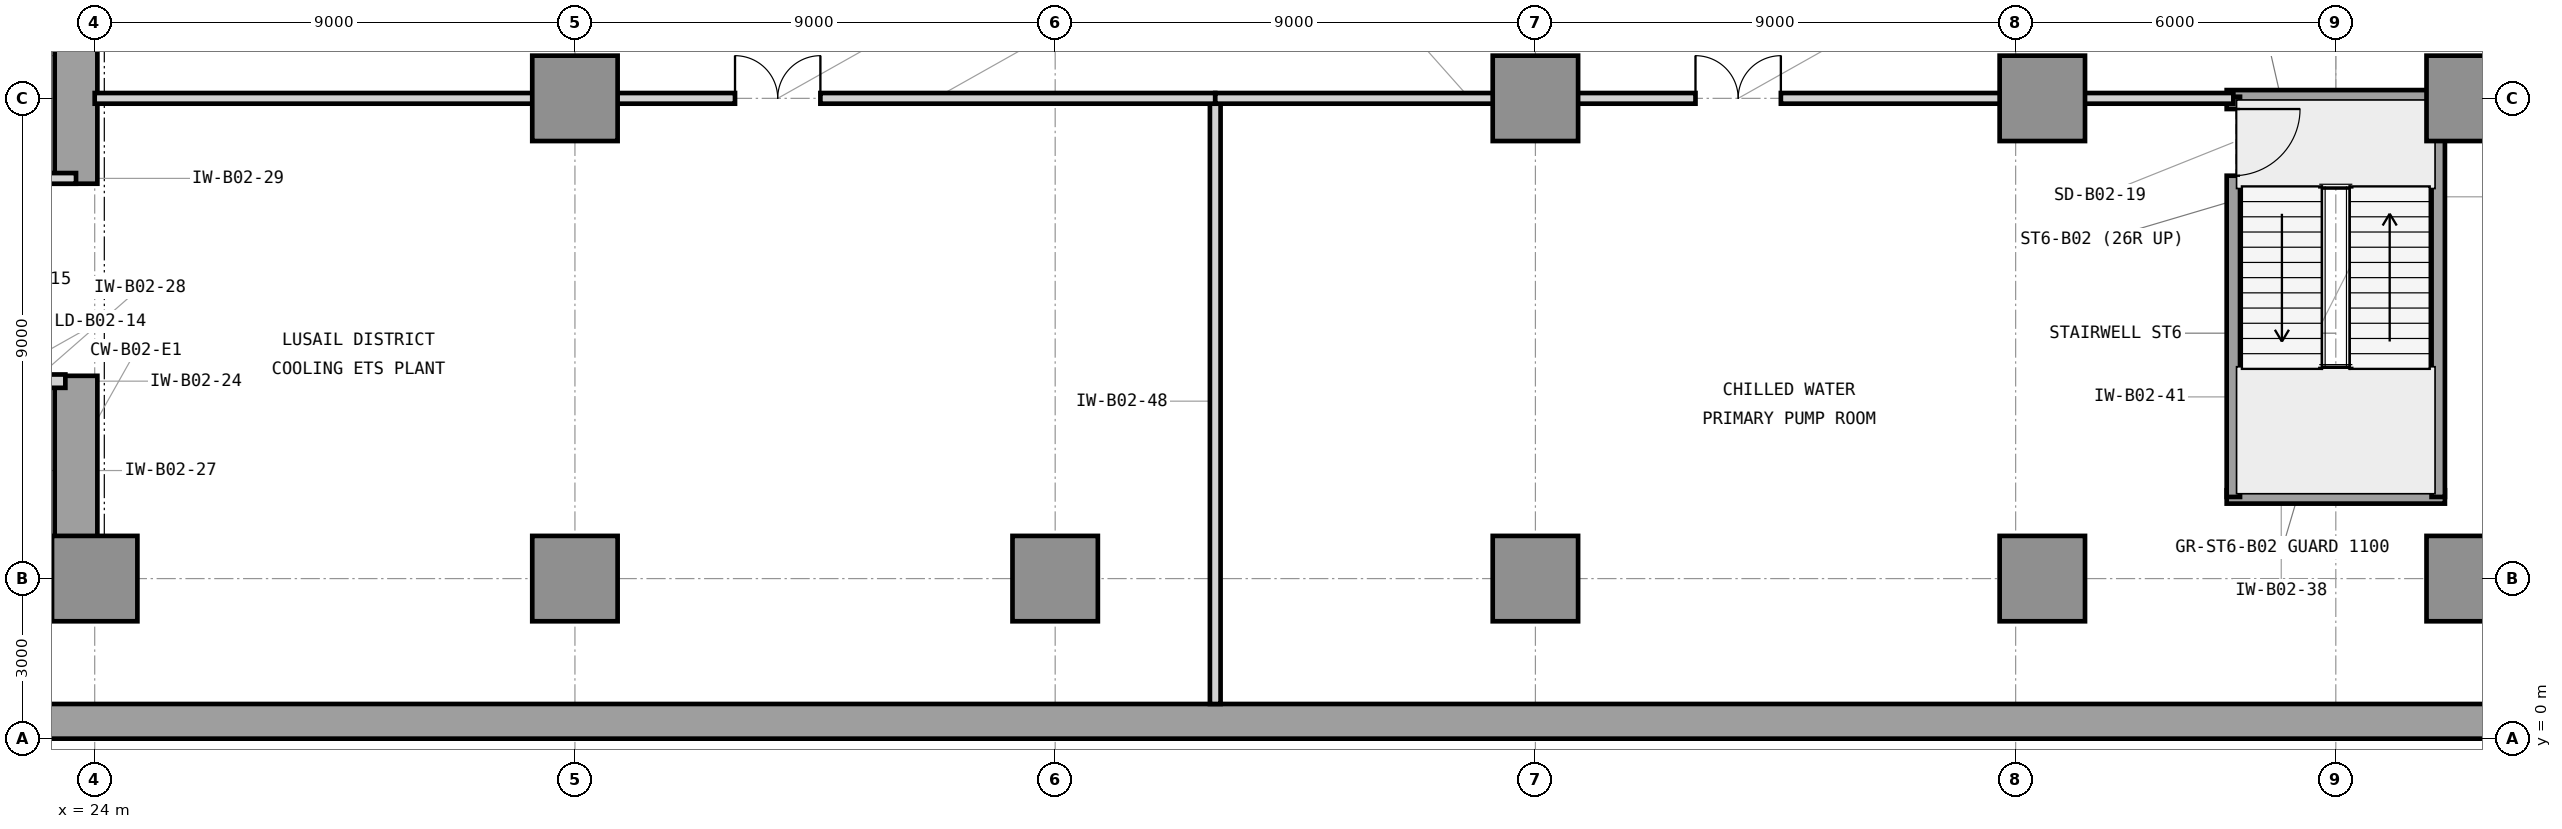
"""IFC4 building model, lengths in metres.
Left out: names, types, materials, properties, quantities, classifications, styles, units other than length and angle.
Written with IfcOpenShell. Run it as: python <this file> out.ifc"""

import sys

from ifc_helpers import new_model, si_unit, direction, frame, frame_2d, origin, origin_2d, place, context, subcontext, project, spatial, rectangle, extrude, element, fill, save


model = new_model("IFC4")
c1 = context("Model", 3, precision=1e-05, world=origin(), true_north=direction((0.0, 1.0)))
c2 = subcontext(c1, "Body", "Model", "MODEL_VIEW")
j1 = project(units=[si_unit("LENGTHUNIT", "METRE"), si_unit("PLANEANGLEUNIT", "RADIAN")], contexts=[c1])
p1 = place(None, origin())
s1 = spatial("IfcSite", under=j1, at=p1, CompositionType="ELEMENT")
p2 = place(p1, origin())
s2 = spatial("IfcBuilding", under=s1, at=p2, CompositionType="ELEMENT")
p3 = place(p2, frame((0.0, 0.0, -9.0)))
s3 = spatial("IfcBuildingStorey", under=s2, at=p3, CompositionType="ELEMENT", Elevation=-9.0)
p4 = place(p3, frame((0.0, 0.325, 0.0), z_axis=(0.0, 0.0, 1.0), x_axis=(1.0, 0.0, 0.0)))
e1 = element("IfcWall", 1, at=p4, inside=s3, PredefinedType="USERDEFINED", context=c2, shape_type="SweptSolid", body=[
    extrude(rectangle(XDim=72.0, YDim=0.65, at=frame_2d((36.0, 0.0))), origin(), (0.0, 0.0, 1.0), 4.5),
])
p5 = place(p3, frame((7.475, 3.35, 0.0), z_axis=(0.0, 0.0, 1.0), x_axis=(1.0, 0.0, 0.0)))
e2 = element("IfcWall", 2, at=p5, inside=s3, PredefinedType="SHEAR", context=c2, shape_type="SweptSolid", body=[
    extrude(rectangle(XDim=16.575, YDim=0.8, at=frame_2d((8.288, 0.0))), origin(), (0.0, 0.0, 1.0), 4.5),
])
p6 = place(p3, frame((23.65, 3.75, 0.0), z_axis=(0.0, 0.0, 1.0), x_axis=(0.0, 1.0, 0.0)))
e3 = element("IfcWall", 3, at=p6, inside=s3, PredefinedType="SHEAR", context=c2, shape_type="SweptSolid", body=[
    extrude(rectangle(XDim=3.05, YDim=0.8, at=frame_2d((1.525, 0.0))), origin(), (0.0, 0.0, 1.0), 4.5),
])
p7 = place(p3, frame((23.65, 10.4, 0.0), z_axis=(0.0, 0.0, 1.0), x_axis=(0.0, 1.0, 0.0)))
e4 = element("IfcWall", 4, at=p7, inside=s3, PredefinedType="SHEAR", context=c2, shape_type="SweptSolid", body=[
    extrude(rectangle(XDim=3.2, YDim=0.8, at=frame_2d((1.6, 0.0))), origin(), (0.0, 0.0, 1.0), 4.5),
])
for number, where, z_axis, x_axis in (
    (5, (24.0, 3.0, 0.0), (0.0, 0.0, 1.0), (1.0, 0.0, 0.0)),
    (6, (33.0, 3.0, 0.0), (0.0, 0.0, 1.0), (1.0, 0.0, 0.0)),
    (7, (33.0, 12.0, 0.0), (0.0, 0.0, 1.0), (1.0, 0.0, 0.0)),
    (8, (42.0, 3.0, 0.0), (0.0, 0.0, 1.0), (1.0, 0.0, 0.0)),
    (9, (51.0, 3.0, 0.0), (0.0, 0.0, 1.0), (1.0, 0.0, 0.0)),
    (10, (51.0, 12.0, 0.0), (0.0, 0.0, 1.0), (1.0, 0.0, 0.0)),
    (11, (60.5, 3.0, 0.0), (0.0, 0.0, 1.0), (1.0, 0.0, 0.0)),
    (12, (60.5, 12.0, 0.0), (0.0, 0.0, 1.0), (1.0, 0.0, 0.0)),
    (13, (68.5, 3.0, 0.0), (0.0, 0.0, 1.0), (1.0, 0.0, 0.0)),
    (14, (68.5, 12.0, 0.0), (0.0, 0.0, 1.0), (1.0, 0.0, 0.0)),
):
    element("IfcColumn", number, at=place(p3, frame(where, z_axis=z_axis, x_axis=x_axis)), inside=s3, PredefinedType="COLUMN", context=c2, shape_type="SweptSolid", body=[
        extrude(rectangle(XDim=1.6, YDim=1.6, at=origin_2d()), origin(), (0.0, 0.0, 1.0), 4.5),
    ])
p8 = place(p3, frame((21.05, 6.7, 0.0), z_axis=(0.0, 0.0, 1.0), x_axis=(1.0, 0.0, 0.0)))
e15 = element("IfcWall", 15, at=p8, inside=s3, PredefinedType="PARTITIONING", context=c2, shape_type="SweptSolid", body=[
    extrude(rectangle(XDim=2.4, YDim=0.25, at=frame_2d((1.2, 0.0))), origin(), (0.0, 0.0, 1.0), 3.523),
])
p9 = place(p8, frame((0.48, 0.0, 0.0)))
e16 = element("IfcOpeningElement", 16, at=p9, cuts=e15, PredefinedType="OPENING", context=c2, shape_type="SweptSolid", body=[
    extrude(rectangle(XDim=1.15, YDim=2.25, at=frame_2d((0.575, 1.125))), frame((0.0, 0.135, 0.0), z_axis=(0.0, -1.0, 0.0), x_axis=(1.0, 0.0, 0.0)), (0.0, 0.0, 1.0), 0.27),
])
p10 = place(p3, frame((14.7, 10.5, 0.0), z_axis=(0.0, 0.0, 1.0), x_axis=(1.0, 0.0, 0.0)))
e17 = element("IfcWall", 17, at=p10, inside=s3, PredefinedType="PARTITIONING", context=c2, shape_type="SweptSolid", body=[
    extrude(rectangle(XDim=8.95, YDim=0.2, at=frame_2d((4.475, 0.0))), origin(), (0.0, 0.0, 1.0), 3.523),
])
p11 = place(p10, frame((3.2, 0.0, 0.0)))
e18 = element("IfcOpeningElement", 18, at=p11, cuts=e17, PredefinedType="OPENING", context=c2, shape_type="SweptSolid", body=[
    extrude(rectangle(XDim=1.6, YDim=2.3, at=frame_2d((0.8, 1.15))), frame((0.0, 0.11, 0.0), z_axis=(0.0, -1.0, 0.0), x_axis=(1.0, 0.0, 0.0)), (0.0, 0.0, 1.0), 0.22),
])
for number, where, z_axis, x_axis in (
    (19, (63.955, 4.53, 0.0), (0.0, 0.0, 1.0), (1.0, 0.0, 0.0)),
    (20, (63.955, 12.03, 0.0), (0.0, 0.0, 1.0), (1.0, 0.0, 0.0)),
):
    element("IfcWall", number, at=place(p3, frame(where, z_axis=z_axis, x_axis=x_axis)), inside=s3, PredefinedType="SHEAR", context=c2, shape_type="SweptSolid", body=[
        extrude(rectangle(XDim=4.09, YDim=0.25, at=frame_2d((2.045, 0.0))), origin(), (0.0, 0.0, 1.0), 4.5),
    ])
p12 = place(p3, frame((67.92, 4.53, 0.0), z_axis=(0.0, 0.0, 1.0), x_axis=(0.0, 1.0, 0.0)))
e21 = element("IfcWall", 21, at=p12, inside=s3, PredefinedType="SHEAR", context=c2, shape_type="SweptSolid", body=[
    extrude(rectangle(XDim=7.5, YDim=0.25, at=frame_2d((3.75, 0.0))), origin(), (0.0, 0.0, 1.0), 4.5),
])
p13 = place(p3, frame((64.08, 4.53, 0.0), z_axis=(0.0, 0.0, 1.0), x_axis=(0.0, 1.0, 0.0)))
e22 = element("IfcWall", 22, at=p13, inside=s3, PredefinedType="SHEAR", context=c2, shape_type="SweptSolid", body=[
    extrude(rectangle(XDim=7.5, YDim=0.25, at=frame_2d((3.75, 0.0))), origin(), (0.0, 0.0, 1.0), 4.5),
])
p14 = place(p13, frame((6.02, 0.0, 0.0)))
e23 = element("IfcOpeningElement", 23, at=p14, cuts=e22, PredefinedType="OPENING", context=c2, shape_type="SweptSolid", body=[
    extrude(rectangle(XDim=1.25, YDim=2.2, at=frame_2d((0.625, 1.1))), frame((0.0, 0.135, 0.0), z_axis=(0.0, -1.0, 0.0), x_axis=(1.0, 0.0, 0.0)), (0.0, 0.0, 1.0), 0.27),
])
p15 = place(p3, frame((45.0, 0.65, 0.0), z_axis=(0.0, 0.0, 1.0), x_axis=(0.0, 1.0, 0.0)))
e24 = element("IfcWall", 24, at=p15, inside=s3, PredefinedType="PARTITIONING", context=c2, shape_type="SweptSolid", body=[
    extrude(rectangle(XDim=11.35, YDim=0.2, at=frame_2d((5.675, 0.0))), origin(), (0.0, 0.0, 1.0), 4.14),
])
p16 = place(p3, frame((24.0, 12.0, 0.0), z_axis=(0.0, 0.0, 1.0), x_axis=(1.0, 0.0, 0.0)))
e25 = element("IfcWall", 25, at=p16, inside=s3, PredefinedType="PARTITIONING", context=c2, shape_type="SweptSolid", body=[
    extrude(rectangle(XDim=21.0, YDim=0.2, at=frame_2d((10.5, 0.0))), origin(), (0.0, 0.0, 1.0), 3.2),
])
p17 = place(p16, frame((12.0, 0.0, 0.0)))
e26 = element("IfcOpeningElement", 26, at=p17, cuts=e25, PredefinedType="OPENING", context=c2, shape_type="SweptSolid", body=[
    extrude(rectangle(XDim=1.6, YDim=2.3, at=frame_2d((0.8, 1.15))), frame((0.0, 0.11, 0.0), z_axis=(0.0, -1.0, 0.0), x_axis=(1.0, 0.0, 0.0)), (0.0, 0.0, 1.0), 0.22),
])
p18 = place(p3, frame((45.0, 12.0, 0.0), z_axis=(0.0, 0.0, 1.0), x_axis=(1.0, 0.0, 0.0)))
e27 = element("IfcWall", 27, at=p18, inside=s3, PredefinedType="PARTITIONING", context=c2, shape_type="SweptSolid", body=[
    extrude(rectangle(XDim=19.08, YDim=0.2, at=frame_2d((9.54, 0.0))), origin(), (0.0, 0.0, 1.0), 3.2),
])
p19 = place(p18, frame((9.0, 0.0, 0.0)))
e28 = element("IfcOpeningElement", 28, at=p19, cuts=e27, PredefinedType="OPENING", context=c2, shape_type="SweptSolid", body=[
    extrude(rectangle(XDim=1.6, YDim=2.3, at=frame_2d((0.8, 1.15))), frame((0.0, 0.11, 0.0), z_axis=(0.0, -1.0, 0.0), x_axis=(1.0, 0.0, 0.0)), (0.0, 0.0, 1.0), 0.22),
])
p20 = place(p14, frame((1.25, 0.0, 0.0), z_axis=(0.0, 0.0, 1.0), x_axis=(-1.0, 0.0, 0.0)))
e29 = element("IfcDoor", 29, at=p20, inside=s3, OperationType="SINGLE_SWING_LEFT", PredefinedType="DOOR", context=c2, shape_type="SweptSolid", body=[
    extrude(rectangle(XDim=1.25, YDim=2.2, at=frame_2d((0.625, 1.1))), frame((0.0, 0.025, 0.0), z_axis=(0.0, -1.0, 0.0), x_axis=(1.0, 0.0, 0.0)), (0.0, 0.0, 1.0), 0.05),
])
fill(e23, e29)
p21 = place(p17, origin())
e30 = element("IfcDoor", 30, at=p21, inside=s3, OperationType="DOUBLE_DOOR_SINGLE_SWING", PredefinedType="DOOR", context=c2, shape_type="SweptSolid", body=[
    extrude(rectangle(XDim=1.6, YDim=2.3, at=frame_2d((0.8, 1.15))), frame((0.0, 0.025, 0.0), z_axis=(0.0, -1.0, 0.0), x_axis=(1.0, 0.0, 0.0)), (0.0, 0.0, 1.0), 0.05),
])
fill(e26, e30)
p22 = place(p19, origin())
e31 = element("IfcDoor", 31, at=p22, inside=s3, OperationType="DOUBLE_DOOR_SINGLE_SWING", PredefinedType="DOOR", context=c2, shape_type="SweptSolid", body=[
    extrude(rectangle(XDim=1.6, YDim=2.3, at=frame_2d((0.8, 1.15))), frame((0.0, 0.025, 0.0), z_axis=(0.0, -1.0, 0.0), x_axis=(1.0, 0.0, 0.0)), (0.0, 0.0, 1.0), 0.05),
])
fill(e28, e31)
save(model, sys.argv[1])
